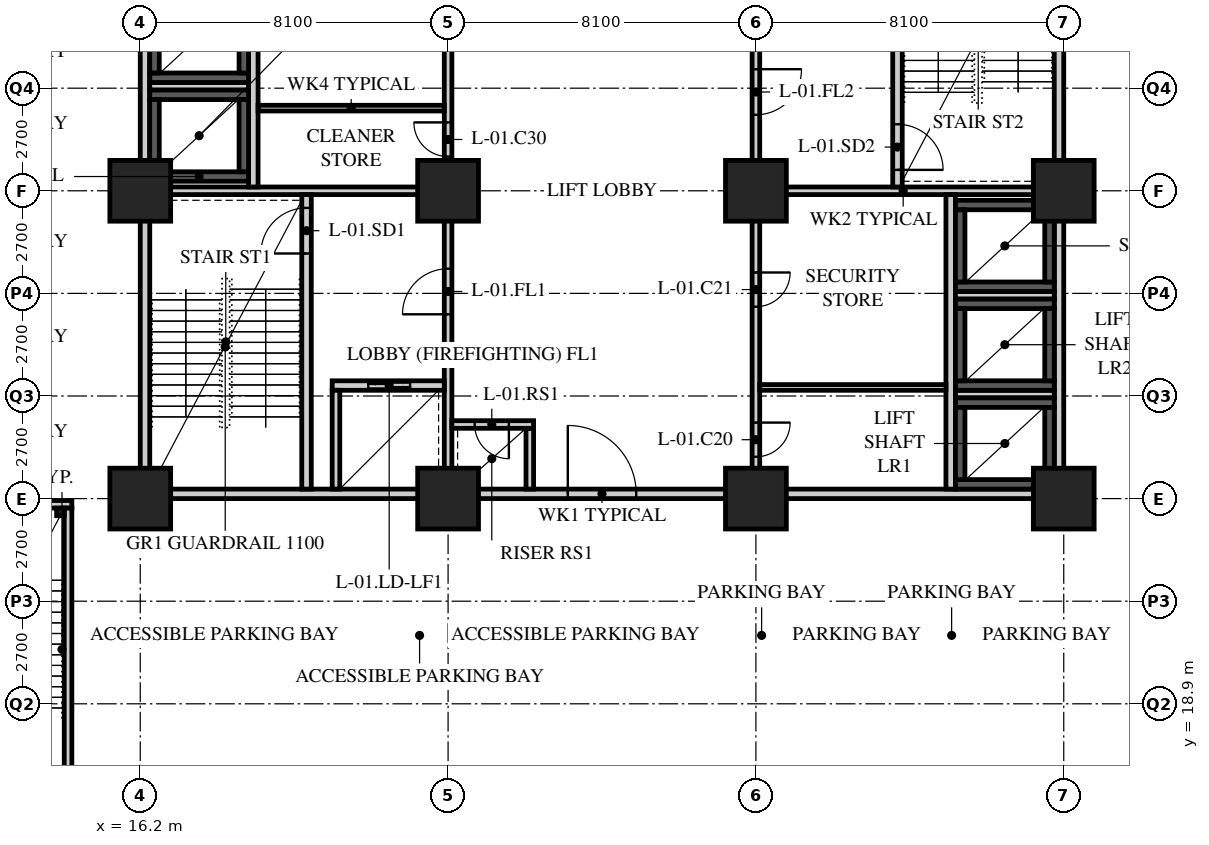
"""IFC4 building model, lengths in metres.
Left out: names, types, materials, properties, quantities, classifications, styles, units other than length and angle.
Written with IfcOpenShell. Run it as: python <this file> out.ifc"""

import sys

from ifc_helpers import new_model, si_unit, direction, frame, frame_2d, origin, origin_2d, place, context, subcontext, project, spatial, rectangle, hollow_rectangle, extrude, element, fill, save


model = new_model("IFC4")
c1 = context("Model", 3, precision=1e-05, world=origin(), true_north=direction((0.0, 1.0)))
c2 = subcontext(c1, "Body", "Model", "MODEL_VIEW")
j1 = project(units=[si_unit("LENGTHUNIT", "METRE"), si_unit("PLANEANGLEUNIT", "RADIAN")], contexts=[c1])
p1 = place(None, origin())
s1 = spatial("IfcSite", under=j1, at=p1, CompositionType="ELEMENT")
p2 = place(p1, origin())
s2 = spatial("IfcBuilding", under=s1, at=p2, CompositionType="ELEMENT")
p3 = place(p2, frame((0.0, 0.0, -4.2)))
s3 = spatial("IfcBuildingStorey", under=s2, at=p3, CompositionType="ELEMENT", Elevation=-4.2)
for number, where, z_axis, x_axis in (
    (1, (16.2, 24.3, 0.0), (0.0, 0.0, 1.0), (1.0, 0.0, 0.0)),
    (2, (16.2, 32.4, 0.0), (0.0, 0.0, 1.0), (1.0, 0.0, 0.0)),
    (3, (24.3, 24.3, 0.0), (0.0, 0.0, 1.0), (1.0, 0.0, 0.0)),
    (4, (24.3, 32.4, 0.0), (0.0, 0.0, 1.0), (1.0, 0.0, 0.0)),
    (5, (32.4, 24.3, 0.0), (0.0, 0.0, 1.0), (1.0, 0.0, 0.0)),
    (6, (32.4, 32.4, 0.0), (0.0, 0.0, 1.0), (1.0, 0.0, 0.0)),
    (7, (40.5, 24.3, 0.0), (0.0, 0.0, 1.0), (1.0, 0.0, 0.0)),
    (8, (40.5, 32.4, 0.0), (0.0, 0.0, 1.0), (1.0, 0.0, 0.0)),
):
    element("IfcColumn", number, at=place(p3, frame(where, z_axis=z_axis, x_axis=x_axis)), inside=s3, PredefinedType="COLUMN", context=c2, shape_type="SweptSolid", body=[
        extrude(hollow_rectangle(XDim=1.6, YDim=1.6, WallThickness=0.15, at=origin_2d()), origin(), (0.0, 0.0, 1.0), 4.2),
    ])
p4 = place(p3, frame((16.2, 24.425, 0.0), z_axis=(0.0, 0.0, 1.0), x_axis=(1.0, 0.0, 0.0)))
e9 = element("IfcWall", 9, at=p4, inside=s3, PredefinedType="SOLIDWALL", context=c2, shape_type="SweptSolid", body=[
    extrude(rectangle(XDim=24.3, YDim=0.25, at=frame_2d((12.15, 0.0))), origin(), (0.0, 0.0, 1.0), 3.3),
])
p5 = place(p4, frame((11.25, 0.0, 0.0)))
e10 = element("IfcOpeningElement", 10, at=p5, cuts=e9, PredefinedType="OPENING", context=c2, shape_type="SweptSolid", body=[
    extrude(rectangle(XDim=1.8, YDim=2.4, at=frame_2d((0.9, 1.2))), frame((0.0, 0.135, 0.0), z_axis=(0.0, -1.0, 0.0), x_axis=(1.0, 0.0, 0.0)), (0.0, 0.0, 1.0), 0.27),
])
for number, where, z_axis, x_axis in (
    (11, (16.325, 24.55, 0.0), (0.0, 0.0, 1.0), (0.0, 1.0, 0.0)),
    (12, (40.375, 24.55, 0.0), (0.0, 0.0, 1.0), (0.0, 1.0, 0.0)),
):
    element("IfcWall", number, at=place(p3, frame(where, z_axis=z_axis, x_axis=x_axis)), inside=s3, PredefinedType="SOLIDWALL", context=c2, shape_type="SweptSolid", body=[
        extrude(rectangle(XDim=15.7, YDim=0.25, at=frame_2d((7.85, 0.0))), origin(), (0.0, 0.0, 1.0), 3.338),
    ])
p6 = place(p3, frame((16.45, 32.4, 0.0), z_axis=(0.0, 0.0, 1.0), x_axis=(1.0, 0.0, 0.0)))
e13 = element("IfcWall", 13, at=p6, inside=s3, PredefinedType="SOLIDWALL", context=c2, shape_type="SweptSolid", body=[
    extrude(rectangle(XDim=7.95, YDim=0.2, at=frame_2d((3.975, 0.0))), origin(), (0.0, 0.0, 1.0), 3.25),
])
p7 = place(p3, frame((24.3, 24.55, 0.0), z_axis=(0.0, 0.0, 1.0), x_axis=(0.0, 1.0, 0.0)))
e14 = element("IfcWall", 14, at=p7, inside=s3, PredefinedType="SOLIDWALL", context=c2, shape_type="SweptSolid", body=[
    extrude(rectangle(XDim=7.75, YDim=0.2, at=frame_2d((3.875, 0.0))), origin(), (0.0, 0.0, 1.0), 3.25),
])
p8 = place(p7, frame((4.6, 0.0, 0.0)))
e15 = element("IfcOpeningElement", 15, at=p8, cuts=e14, PredefinedType="OPENING", context=c2, shape_type="SweptSolid", body=[
    extrude(rectangle(XDim=1.2, YDim=2.1, at=frame_2d((0.6, 1.05))), frame((0.0, 0.11, 0.0), z_axis=(0.0, -1.0, 0.0), x_axis=(1.0, 0.0, 0.0)), (0.0, 0.0, 1.0), 0.22),
])
p9 = place(p3, frame((20.575, 24.55, 0.0), z_axis=(0.0, 0.0, 1.0), x_axis=(0.0, 1.0, 0.0)))
e16 = element("IfcWall", 16, at=p9, inside=s3, PredefinedType="SOLIDWALL", context=c2, shape_type="SweptSolid", body=[
    extrude(rectangle(XDim=7.75, YDim=0.25, at=frame_2d((3.875, 0.0))), origin(), (0.0, 0.0, 1.0), 3.95),
])
p10 = place(p9, frame((6.2, 0.0, 0.0)))
e17 = element("IfcOpeningElement", 17, at=p10, cuts=e16, PredefinedType="OPENING", context=c2, shape_type="SweptSolid", body=[
    extrude(rectangle(XDim=1.2, YDim=2.1, at=frame_2d((0.6, 1.05))), frame((0.0, 0.135, 0.0), z_axis=(0.0, -1.0, 0.0), x_axis=(1.0, 0.0, 0.0)), (0.0, 0.0, 1.0), 0.27),
])
p11 = place(p3, frame((21.25, 27.275, 0.0), z_axis=(0.0, 0.0, 1.0), x_axis=(1.0, 0.0, 0.0)))
e18 = element("IfcWall", 18, at=p11, inside=s3, PredefinedType="SOLIDWALL", context=c2, shape_type="SweptSolid", body=[
    extrude(rectangle(XDim=2.95, YDim=0.25, at=frame_2d((1.475, 0.0))), origin(), (0.0, 0.0, 1.0), 3.95),
])
p12 = place(p11, frame((0.95, 0.0, 0.0)))
e19 = element("IfcOpeningElement", 19, at=p12, cuts=e18, PredefinedType="OPENING", context=c2, shape_type="SweptSolid", body=[
    extrude(rectangle(XDim=1.1, YDim=2.4, at=frame_2d((0.55, 1.2))), frame((0.0, 0.135, 0.0), z_axis=(0.0, -1.0, 0.0), x_axis=(1.0, 0.0, 0.0)), (0.0, 0.0, 1.0), 0.27),
])
p13 = place(p3, frame((21.35, 24.55, 0.0), z_axis=(0.0, 0.0, 1.0), x_axis=(0.0, 1.0, 0.0)))
e20 = element("IfcWall", 20, at=p13, inside=s3, PredefinedType="SOLIDWALL", context=c2, shape_type="SweptSolid", body=[
    extrude(rectangle(XDim=2.6, YDim=0.2, at=frame_2d((1.3, 0.0))), origin(), (0.0, 0.0, 1.0), 3.95),
])
p14 = place(p3, frame((19.175, 32.5, 0.0), z_axis=(0.0, 0.0, 1.0), x_axis=(0.0, 1.0, 0.0)))
e21 = element("IfcWall", 21, at=p14, inside=s3, PredefinedType="SOLIDWALL", context=c2, shape_type="SweptSolid", body=[
    extrude(rectangle(XDim=7.75, YDim=0.25, at=frame_2d((3.875, 0.0))), origin(), (0.0, 0.0, 1.0), 3.95),
])
p15 = place(p3, frame((16.45, 35.15, 0.0), z_axis=(0.0, 0.0, 1.0), x_axis=(1.0, 0.0, 0.0)))
e22 = element("IfcWall", 22, at=p15, inside=s3, PredefinedType="SOLIDWALL", context=c2, shape_type="SweptSolid", body=[
    extrude(rectangle(XDim=2.6, YDim=0.2, at=frame_2d((1.3, 0.0))), origin(), (0.0, 0.0, 1.0), 3.95),
])
p16 = place(p3, frame((26.45, 24.55, 0.0), z_axis=(0.0, 0.0, 1.0), x_axis=(0.0, 1.0, 0.0)))
e23 = element("IfcWall", 23, at=p16, inside=s3, PredefinedType="SOLIDWALL", context=c2, shape_type="SweptSolid", body=[
    extrude(rectangle(XDim=1.6, YDim=0.2, at=frame_2d((0.8, 0.0))), origin(), (0.0, 0.0, 1.0), 3.95),
])
p17 = place(p3, frame((24.4, 26.25, 0.0), z_axis=(0.0, 0.0, 1.0), x_axis=(1.0, 0.0, 0.0)))
e24 = element("IfcWall", 24, at=p17, inside=s3, PredefinedType="SOLIDWALL", context=c2, shape_type="SweptSolid", body=[
    extrude(rectangle(XDim=2.15, YDim=0.2, at=frame_2d((1.075, 0.0))), origin(), (0.0, 0.0, 1.0), 3.95),
])
p18 = place(p17, frame((0.6, 0.0, 0.0)))
e25 = element("IfcOpeningElement", 25, at=p18, cuts=e24, PredefinedType="OPENING", context=c2, shape_type="SweptSolid", body=[
    extrude(rectangle(XDim=0.9, YDim=2.1, at=frame_2d((0.45, 1.05))), frame((0.0, 0.11, 0.0), z_axis=(0.0, -1.0, 0.0), x_axis=(1.0, 0.0, 0.0)), (0.0, 0.0, 1.0), 0.22),
])
p19 = place(p3, frame((32.3, 32.4, 0.0), z_axis=(0.0, 0.0, 1.0), x_axis=(1.0, 0.0, 0.0)))
e26 = element("IfcWall", 26, at=p19, inside=s3, PredefinedType="SOLIDWALL", context=c2, shape_type="SweptSolid", body=[
    extrude(rectangle(XDim=7.95, YDim=0.2, at=frame_2d((3.975, 0.0))), origin(), (0.0, 0.0, 1.0), 3.25),
])
p20 = place(p3, frame((32.4, 32.5, 0.0), z_axis=(0.0, 0.0, 1.0), x_axis=(0.0, 1.0, 0.0)))
e27 = element("IfcWall", 27, at=p20, inside=s3, PredefinedType="SOLIDWALL", context=c2, shape_type="SweptSolid", body=[
    extrude(rectangle(XDim=7.75, YDim=0.2, at=frame_2d((3.875, 0.0))), origin(), (0.0, 0.0, 1.0), 3.25),
])
p21 = place(p20, frame((1.9, 0.0, 0.0)))
e28 = element("IfcOpeningElement", 28, at=p21, cuts=e27, PredefinedType="OPENING", context=c2, shape_type="SweptSolid", body=[
    extrude(rectangle(XDim=1.2, YDim=2.1, at=frame_2d((0.6, 1.05))), frame((0.0, 0.11, 0.0), z_axis=(0.0, -1.0, 0.0), x_axis=(1.0, 0.0, 0.0)), (0.0, 0.0, 1.0), 0.22),
])
p22 = place(p3, frame((37.525, 24.55, 0.0), z_axis=(0.0, 0.0, 1.0), x_axis=(0.0, 1.0, 0.0)))
e29 = element("IfcWall", 29, at=p22, inside=s3, PredefinedType="SOLIDWALL", context=c2, shape_type="SweptSolid", body=[
    extrude(rectangle(XDim=7.75, YDim=0.25, at=frame_2d((3.875, 0.0))), origin(), (0.0, 0.0, 1.0), 3.95),
])
for number, where, z_axis, x_axis in (
    (30, (37.65, 27.05, 0.0), (0.0, 0.0, 1.0), (1.0, 0.0, 0.0)),
    (31, (37.65, 29.65, 0.0), (0.0, 0.0, 1.0), (1.0, 0.0, 0.0)),
):
    element("IfcWall", number, at=place(p3, frame(where, z_axis=z_axis, x_axis=x_axis)), inside=s3, PredefinedType="SOLIDWALL", context=c2, shape_type="SweptSolid", body=[
        extrude(rectangle(XDim=2.6, YDim=0.2, at=frame_2d((1.3, 0.0))), origin(), (0.0, 0.0, 1.0), 3.95),
    ])
p23 = place(p3, frame((36.125, 32.5, 0.0), z_axis=(0.0, 0.0, 1.0), x_axis=(0.0, 1.0, 0.0)))
e32 = element("IfcWall", 32, at=p23, inside=s3, PredefinedType="SOLIDWALL", context=c2, shape_type="SweptSolid", body=[
    extrude(rectangle(XDim=7.75, YDim=0.25, at=frame_2d((3.875, 0.0))), origin(), (0.0, 0.0, 1.0), 3.95),
])
p24 = place(p23, frame((0.45, 0.0, 0.0)))
e33 = element("IfcOpeningElement", 33, at=p24, cuts=e32, PredefinedType="OPENING", context=c2, shape_type="SweptSolid", body=[
    extrude(rectangle(XDim=1.2, YDim=2.1, at=frame_2d((0.6, 1.05))), frame((0.0, 0.135, 0.0), z_axis=(0.0, -1.0, 0.0), x_axis=(1.0, 0.0, 0.0)), (0.0, 0.0, 1.0), 0.27),
])
p25 = place(p3, frame((24.3, 32.5, 0.0), z_axis=(0.0, 0.0, 1.0), x_axis=(0.0, 1.0, 0.0)))
e34 = element("IfcWall", 34, at=p25, inside=s3, PredefinedType="PARTITIONING", context=c2, shape_type="SweptSolid", body=[
    extrude(rectangle(XDim=7.75, YDim=0.2, at=frame_2d((3.875, 0.0))), origin(), (0.0, 0.0, 1.0), 3.25),
])
p26 = place(p25, frame((0.8, 0.0, 0.0)))
e35 = element("IfcOpeningElement", 35, at=p26, cuts=e34, PredefinedType="OPENING", context=c2, shape_type="SweptSolid", body=[
    extrude(rectangle(XDim=0.9, YDim=2.1, at=frame_2d((0.45, 1.05))), frame((0.0, 0.11, 0.0), z_axis=(0.0, -1.0, 0.0), x_axis=(1.0, 0.0, 0.0)), (0.0, 0.0, 1.0), 0.22),
])
p27 = place(p25, frame((4.5, 0.0, 0.0)))
e36 = element("IfcOpeningElement", 36, at=p27, cuts=e34, PredefinedType="OPENING", context=c2, shape_type="SweptSolid", body=[
    extrude(rectangle(XDim=0.9, YDim=2.1, at=frame_2d((0.45, 1.05))), frame((0.0, 0.11, 0.0), z_axis=(0.0, -1.0, 0.0), x_axis=(1.0, 0.0, 0.0)), (0.0, 0.0, 1.0), 0.22),
])
p28 = place(p3, frame((19.3, 34.575, 0.0), z_axis=(0.0, 0.0, 1.0), x_axis=(1.0, 0.0, 0.0)))
e37 = element("IfcWall", 37, at=p28, inside=s3, PredefinedType="PARTITIONING", context=c2, shape_type="SweptSolid", body=[
    extrude(rectangle(XDim=4.9, YDim=0.15, at=frame_2d((2.45, 0.0))), origin(), (0.0, 0.0, 1.0), 3.95),
])
p29 = place(p3, frame((32.4, 24.55, 0.0), z_axis=(0.0, 0.0, 1.0), x_axis=(0.0, 1.0, 0.0)))
e38 = element("IfcWall", 38, at=p29, inside=s3, PredefinedType="PARTITIONING", context=c2, shape_type="SweptSolid", body=[
    extrude(rectangle(XDim=7.75, YDim=0.2, at=frame_2d((3.875, 0.0))), origin(), (0.0, 0.0, 1.0), 3.25),
])
p30 = place(p29, frame((0.85, 0.0, 0.0)))
e39 = element("IfcOpeningElement", 39, at=p30, cuts=e38, PredefinedType="OPENING", context=c2, shape_type="SweptSolid", body=[
    extrude(rectangle(XDim=0.9, YDim=2.1, at=frame_2d((0.45, 1.05))), frame((0.0, 0.11, 0.0), z_axis=(0.0, -1.0, 0.0), x_axis=(1.0, 0.0, 0.0)), (0.0, 0.0, 1.0), 0.22),
])
p31 = place(p29, frame((4.8, 0.0, 0.0)))
e40 = element("IfcOpeningElement", 40, at=p31, cuts=e38, PredefinedType="OPENING", context=c2, shape_type="SweptSolid", body=[
    extrude(rectangle(XDim=0.9, YDim=2.1, at=frame_2d((0.45, 1.05))), frame((0.0, 0.11, 0.0), z_axis=(0.0, -1.0, 0.0), x_axis=(1.0, 0.0, 0.0)), (0.0, 0.0, 1.0), 0.22),
])
p32 = place(p3, frame((32.5, 27.225, 0.0), z_axis=(0.0, 0.0, 1.0), x_axis=(1.0, 0.0, 0.0)))
e41 = element("IfcWall", 41, at=p32, inside=s3, PredefinedType="PARTITIONING", context=c2, shape_type="SweptSolid", body=[
    extrude(rectangle(XDim=4.9, YDim=0.15, at=frame_2d((2.45, 0.0))), origin(), (0.0, 0.0, 1.0), 3.95),
])
p33 = place(p3, frame((10.0, 24.15, 0.0), z_axis=(0.0, 0.0, 1.0), x_axis=(1.0, 0.0, 0.0)))
e42 = element("IfcWall", 42, at=p33, inside=s3, PredefinedType="SOLIDWALL", context=c2, shape_type="SweptSolid", body=[
    extrude(rectangle(XDim=4.4, YDim=0.2, at=frame_2d((2.2, 0.0))), origin(), (0.0, 0.0, 1.0), 3.338),
])
p34 = place(p3, frame((14.3, 16.45, 0.0), z_axis=(0.0, 0.0, 1.0), x_axis=(0.0, 1.0, 0.0)))
e43 = element("IfcWall", 43, at=p34, inside=s3, PredefinedType="SOLIDWALL", context=c2, shape_type="SweptSolid", body=[
    extrude(rectangle(XDim=7.6, YDim=0.2, at=frame_2d((3.8, 0.0))), origin(), (0.0, 0.0, 1.0), 3.95),
])
p35 = place(p3, frame((14.1, 23.95, 0.0), z_axis=(0.0, 0.0, 1.0), x_axis=(1.0, 0.0, 0.0)))
e44 = element("IfcColumn", 44, at=p35, inside=s3, PredefinedType="COLUMN", context=c2, shape_type="SweptSolid", body=[
    extrude(hollow_rectangle(XDim=0.2, YDim=0.2, WallThickness=0.012, at=origin_2d()), origin(), (0.0, 0.0, 1.0), 4.2),
])
for number, where, z_axis, x_axis in (
    (45, (16.45, 32.775, 0.0), (0.0, 0.0, 1.0), (1.0, 0.0, 0.0)),
    (46, (16.45, 34.925, 0.0), (0.0, 0.0, 1.0), (1.0, 0.0, 0.0)),
):
    element("IfcWall", number, at=place(p3, frame(where, z_axis=z_axis, x_axis=x_axis)), inside=s3, PredefinedType="SOLIDWALL", context=c2, shape_type="SweptSolid", body=[
        extrude(rectangle(XDim=2.6, YDim=0.25, at=frame_2d((1.3, 0.0))), origin(), (0.0, 0.0, 1.0), 2.4),
    ])
for number, where, z_axis, x_axis in (
    (47, (16.575, 32.9, 0.0), (0.0, 0.0, 1.0), (0.0, 1.0, 0.0)),
    (48, (18.925, 32.9, 0.0), (0.0, 0.0, 1.0), (0.0, 1.0, 0.0)),
):
    element("IfcWall", number, at=place(p3, frame(where, z_axis=z_axis, x_axis=x_axis)), inside=s3, PredefinedType="SOLIDWALL", context=c2, shape_type="SweptSolid", body=[
        extrude(rectangle(XDim=1.9, YDim=0.25, at=frame_2d((0.95, 0.0))), origin(), (0.0, 0.0, 1.0), 2.4),
    ])
p36 = place(p3, frame((16.45, 35.375, 0.0), z_axis=(0.0, 0.0, 1.0), x_axis=(1.0, 0.0, 0.0)))
e49 = element("IfcWall", 49, at=p36, inside=s3, PredefinedType="SOLIDWALL", context=c2, shape_type="SweptSolid", body=[
    extrude(rectangle(XDim=2.6, YDim=0.25, at=frame_2d((1.3, 0.0))), origin(), (0.0, 0.0, 1.0), 2.4),
])
for number, where, z_axis, x_axis in (
    (50, (16.575, 35.5, 0.0), (0.0, 0.0, 1.0), (0.0, 1.0, 0.0)),
    (51, (18.925, 35.5, 0.0), (0.0, 0.0, 1.0), (0.0, 1.0, 0.0)),
):
    element("IfcWall", number, at=place(p3, frame(where, z_axis=z_axis, x_axis=x_axis)), inside=s3, PredefinedType="SOLIDWALL", context=c2, shape_type="SweptSolid", body=[
        extrude(rectangle(XDim=1.9, YDim=0.25, at=frame_2d((0.95, 0.0))), origin(), (0.0, 0.0, 1.0), 2.4),
    ])
for number, where, z_axis, x_axis in (
    (52, (37.65, 24.675, 0.0), (0.0, 0.0, 1.0), (1.0, 0.0, 0.0)),
    (53, (37.65, 26.825, 0.0), (0.0, 0.0, 1.0), (1.0, 0.0, 0.0)),
):
    element("IfcWall", number, at=place(p3, frame(where, z_axis=z_axis, x_axis=x_axis)), inside=s3, PredefinedType="SOLIDWALL", context=c2, shape_type="SweptSolid", body=[
        extrude(rectangle(XDim=2.6, YDim=0.25, at=frame_2d((1.3, 0.0))), origin(), (0.0, 0.0, 1.0), 2.4),
    ])
for number, where, z_axis, x_axis in (
    (54, (37.775, 24.8, 0.0), (0.0, 0.0, 1.0), (0.0, 1.0, 0.0)),
    (55, (40.125, 24.8, 0.0), (0.0, 0.0, 1.0), (0.0, 1.0, 0.0)),
):
    element("IfcWall", number, at=place(p3, frame(where, z_axis=z_axis, x_axis=x_axis)), inside=s3, PredefinedType="SOLIDWALL", context=c2, shape_type="SweptSolid", body=[
        extrude(rectangle(XDim=1.9, YDim=0.25, at=frame_2d((0.95, 0.0))), origin(), (0.0, 0.0, 1.0), 2.4),
    ])
for number, where, z_axis, x_axis in (
    (56, (37.65, 27.275, 0.0), (0.0, 0.0, 1.0), (1.0, 0.0, 0.0)),
    (57, (37.65, 29.425, 0.0), (0.0, 0.0, 1.0), (1.0, 0.0, 0.0)),
):
    element("IfcWall", number, at=place(p3, frame(where, z_axis=z_axis, x_axis=x_axis)), inside=s3, PredefinedType="SOLIDWALL", context=c2, shape_type="SweptSolid", body=[
        extrude(rectangle(XDim=2.6, YDim=0.25, at=frame_2d((1.3, 0.0))), origin(), (0.0, 0.0, 1.0), 2.4),
    ])
for number, where, z_axis, x_axis in (
    (58, (37.775, 27.4, 0.0), (0.0, 0.0, 1.0), (0.0, 1.0, 0.0)),
    (59, (40.125, 27.4, 0.0), (0.0, 0.0, 1.0), (0.0, 1.0, 0.0)),
):
    element("IfcWall", number, at=place(p3, frame(where, z_axis=z_axis, x_axis=x_axis)), inside=s3, PredefinedType="SOLIDWALL", context=c2, shape_type="SweptSolid", body=[
        extrude(rectangle(XDim=1.9, YDim=0.25, at=frame_2d((0.95, 0.0))), origin(), (0.0, 0.0, 1.0), 2.4),
    ])
for number, where, z_axis, x_axis in (
    (60, (37.65, 29.875, 0.0), (0.0, 0.0, 1.0), (1.0, 0.0, 0.0)),
    (61, (37.65, 32.025, 0.0), (0.0, 0.0, 1.0), (1.0, 0.0, 0.0)),
):
    element("IfcWall", number, at=place(p3, frame(where, z_axis=z_axis, x_axis=x_axis)), inside=s3, PredefinedType="SOLIDWALL", context=c2, shape_type="SweptSolid", body=[
        extrude(rectangle(XDim=2.6, YDim=0.25, at=frame_2d((1.3, 0.0))), origin(), (0.0, 0.0, 1.0), 2.4),
    ])
for number, where, z_axis, x_axis in (
    (62, (37.775, 30.0, 0.0), (0.0, 0.0, 1.0), (0.0, 1.0, 0.0)),
    (63, (40.125, 30.0, 0.0), (0.0, 0.0, 1.0), (0.0, 1.0, 0.0)),
):
    element("IfcWall", number, at=place(p3, frame(where, z_axis=z_axis, x_axis=x_axis)), inside=s3, PredefinedType="SOLIDWALL", context=c2, shape_type="SweptSolid", body=[
        extrude(rectangle(XDim=1.9, YDim=0.25, at=frame_2d((0.95, 0.0))), origin(), (0.0, 0.0, 1.0), 2.4),
    ])
p37 = place(p26, origin())
e64 = element("IfcDoor", 64, at=p37, inside=s3, OperationType="SINGLE_SWING_RIGHT", PredefinedType="DOOR", context=c2, shape_type="SweptSolid", body=[
    extrude(rectangle(XDim=0.9, YDim=2.1, at=frame_2d((0.45, 1.05))), frame((0.0, 0.025, 0.0), z_axis=(0.0, -1.0, 0.0), x_axis=(1.0, 0.0, 0.0)), (0.0, 0.0, 1.0), 0.05),
])
fill(e35, e64)
p38 = place(p30, origin())
e65 = element("IfcDoor", 65, at=p38, inside=s3, OperationType="SINGLE_SWING_LEFT", PredefinedType="DOOR", context=c2, shape_type="SweptSolid", body=[
    extrude(rectangle(XDim=0.9, YDim=2.1, at=frame_2d((0.45, 1.05))), frame((0.0, 0.025, 0.0), z_axis=(0.0, -1.0, 0.0), x_axis=(1.0, 0.0, 0.0)), (0.0, 0.0, 1.0), 0.05),
])
fill(e39, e65)
p39 = place(p31, origin())
e66 = element("IfcDoor", 66, at=p39, inside=s3, OperationType="SINGLE_SWING_LEFT", PredefinedType="DOOR", context=c2, shape_type="SweptSolid", body=[
    extrude(rectangle(XDim=0.9, YDim=2.1, at=frame_2d((0.45, 1.05))), frame((0.0, 0.025, 0.0), z_axis=(0.0, -1.0, 0.0), x_axis=(1.0, 0.0, 0.0)), (0.0, 0.0, 1.0), 0.05),
])
fill(e40, e66)
p40 = place(p10, origin())
e67 = element("IfcDoor", 67, at=p40, inside=s3, OperationType="SINGLE_SWING_LEFT", PredefinedType="DOOR", context=c2, shape_type="SweptSolid", body=[
    extrude(rectangle(XDim=1.2, YDim=2.1, at=frame_2d((0.6, 1.05))), frame((0.0, 0.025, 0.0), z_axis=(0.0, -1.0, 0.0), x_axis=(1.0, 0.0, 0.0)), (0.0, 0.0, 1.0), 0.05),
])
fill(e17, e67)
p41 = place(p8, origin())
e68 = element("IfcDoor", 68, at=p41, inside=s3, OperationType="SINGLE_SWING_LEFT", PredefinedType="DOOR", context=c2, shape_type="SweptSolid", body=[
    extrude(rectangle(XDim=1.2, YDim=2.1, at=frame_2d((0.6, 1.05))), frame((0.0, 0.025, 0.0), z_axis=(0.0, -1.0, 0.0), x_axis=(1.0, 0.0, 0.0)), (0.0, 0.0, 1.0), 0.05),
])
fill(e15, e68)
p42 = place(p18, origin())
e69 = element("IfcDoor", 69, at=p42, inside=s3, OperationType="SINGLE_SWING_LEFT", PredefinedType="DOOR", context=c2, shape_type="SweptSolid", body=[
    extrude(rectangle(XDim=0.9, YDim=2.1, at=frame_2d((0.45, 1.05))), frame((0.0, 0.025, 0.0), z_axis=(0.0, -1.0, 0.0), x_axis=(1.0, 0.0, 0.0)), (0.0, 0.0, 1.0), 0.05),
])
fill(e25, e69)
p43 = place(p24, origin())
e70 = element("IfcDoor", 70, at=p43, inside=s3, OperationType="SINGLE_SWING_RIGHT", PredefinedType="DOOR", context=c2, shape_type="SweptSolid", body=[
    extrude(rectangle(XDim=1.2, YDim=2.1, at=frame_2d((0.6, 1.05))), frame((0.0, 0.025, 0.0), z_axis=(0.0, -1.0, 0.0), x_axis=(1.0, 0.0, 0.0)), (0.0, 0.0, 1.0), 0.05),
])
fill(e33, e70)
p44 = place(p21, origin())
e71 = element("IfcDoor", 71, at=p44, inside=s3, OperationType="SINGLE_SWING_LEFT", PredefinedType="DOOR", context=c2, shape_type="SweptSolid", body=[
    extrude(rectangle(XDim=1.2, YDim=2.1, at=frame_2d((0.6, 1.05))), frame((0.0, 0.025, 0.0), z_axis=(0.0, -1.0, 0.0), x_axis=(1.0, 0.0, 0.0)), (0.0, 0.0, 1.0), 0.05),
])
fill(e28, e71)
p45 = place(p12, origin())
e72 = element("IfcDoor", 72, at=p45, inside=s3, OperationType="DOUBLE_DOOR_SLIDING", PredefinedType="DOOR", context=c2, shape_type="SweptSolid", body=[
    extrude(rectangle(XDim=1.1, YDim=2.4, at=frame_2d((0.55, 1.2))), frame((0.0, 0.025, 0.0), z_axis=(0.0, -1.0, 0.0), x_axis=(1.0, 0.0, 0.0)), (0.0, 0.0, 1.0), 0.05),
])
fill(e19, e72)
p46 = place(p5, origin())
e73 = element("IfcDoor", 73, at=p46, inside=s3, OperationType="DOUBLE_DOOR_SINGLE_SWING", PredefinedType="DOOR", context=c2, shape_type="SweptSolid", body=[
    extrude(rectangle(XDim=1.8, YDim=2.4, at=frame_2d((0.9, 1.2))), frame((0.0, 0.025, 0.0), z_axis=(0.0, -1.0, 0.0), x_axis=(1.0, 0.0, 0.0)), (0.0, 0.0, 1.0), 0.05),
])
fill(e10, e73)
save(model, sys.argv[1])
